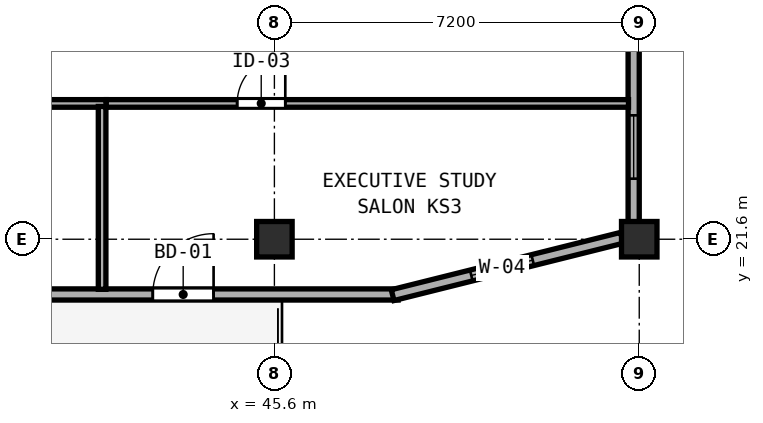
"""IFC4 building model, lengths in metres.
Left out: names, types, materials, properties, quantities, classifications, styles, units other than length and angle.
Written with IfcOpenShell. Run it as: python <this file> out.ifc"""

import sys

from ifc_helpers import new_model, si_unit, direction, frame, frame_2d, origin, origin_2d, place, context, subcontext, project, spatial, rectangle, hollow_rectangle, extrude, element, fill, save


model = new_model("IFC4")
c1 = context("Model", 3, precision=1e-05, world=origin(), true_north=direction((0.0, 1.0)))
c2 = subcontext(c1, "Body", "Model", "MODEL_VIEW")
j1 = project(units=[si_unit("LENGTHUNIT", "METRE"), si_unit("PLANEANGLEUNIT", "RADIAN")], contexts=[c1])
p1 = place(None, origin())
s1 = spatial("IfcSite", under=j1, at=p1, CompositionType="ELEMENT")
p2 = place(p1, origin())
s2 = spatial("IfcBuilding", under=s1, at=p2, CompositionType="ELEMENT")
p3 = place(p2, frame((0.0, 0.0, 282.2)))
s3 = spatial("IfcBuildingStorey", under=s2, at=p3, CompositionType="ELEMENT", Elevation=282.2)
for number, where, z_axis, x_axis in (
    (1, (52.8, 21.6, 0.0), (0.0, 0.0, 1.0), (1.0, 0.0, 0.0)),
    (2, (45.6, 21.6, 0.0), (0.0, 0.0, 1.0), (1.0, 0.0, 0.0)),
):
    element("IfcColumn", number, at=place(p3, frame(where, z_axis=z_axis, x_axis=x_axis)), inside=s3, PredefinedType="COLUMN", context=c2, shape_type="SweptSolid", body=[
        extrude(hollow_rectangle(XDim=0.7, YDim=0.7, WallThickness=0.026, at=origin_2d()), origin(), (0.0, 0.0, 1.0), 3.9),
    ])
p4 = place(p3, frame((28.759, 20.51, 0.0), z_axis=(0.0, 0.0, 1.0), x_axis=(1.0, 0.0, 0.0)))
e3 = element("IfcWall", 3, at=p4, inside=s3, PredefinedType="SOLIDWALL", context=c2, shape_type="SweptSolid", body=[
    extrude(rectangle(XDim=19.283, YDim=0.22, at=frame_2d((9.642, 0.0))), origin(), (0.0, 0.0, 1.0), 3.72),
])
p5 = place(p4, frame((15.641, 0.0, 0.0), z_axis=(0.0, 0.0, 1.0), x_axis=(-1.0, 0.0, 0.0)))
e4 = element("IfcOpeningElement", 4, at=p5, cuts=e3, PredefinedType="OPENING", context=c2, shape_type="SweptSolid", body=[
    extrude(rectangle(XDim=1.2, YDim=2.15, at=frame_2d((0.6, 1.075))), frame((0.0, 0.12, 0.0), z_axis=(0.0, -1.0, 0.0), x_axis=(1.0, 0.0, 0.0)), (0.0, 0.0, 1.0), 0.24),
])
p6 = place(p3, frame((47.933, 20.497, 0.0), z_axis=(0.0, 0.0, 1.0), x_axis=(0.970136341762, 0.242560257242, 0.0)))
e5 = element("IfcWall", 5, at=p6, inside=s3, PredefinedType="SOLIDWALL", context=c2, shape_type="SweptSolid", body=[
    extrude(rectangle(XDim=4.664, YDim=0.22, at=frame_2d((2.332, 0.0))), origin(), (0.0, 0.0, 1.0), 3.365),
])
p7 = place(p6, frame((1.6, 0.0, 0.85)))
e6 = element("IfcOpeningElement", 6, at=p7, cuts=e5, PredefinedType="OPENING", context=c2, shape_type="SweptSolid", body=[
    extrude(rectangle(XDim=1.25, YDim=1.95, at=frame_2d((0.625, 0.975))), frame((0.0, 0.12, 0.0), z_axis=(0.0, -1.0, 0.0), x_axis=(1.0, 0.0, 0.0)), (0.0, 0.0, 1.0), 0.24),
])
p8 = place(p3, frame((52.69, 21.942, 0.0), z_axis=(0.0, 0.0, 1.0), x_axis=(0.0, 1.0, 0.0)))
e7 = element("IfcWall", 7, at=p8, inside=s3, PredefinedType="SOLIDWALL", context=c2, shape_type="SweptSolid", body=[
    extrude(rectangle(XDim=5.366, YDim=0.22, at=frame_2d((2.683, 0.0))), origin(), (0.0, 0.0, 1.0), 3.365),
])
p9 = place(p8, frame((0.853, 0.0, 0.85)))
e8 = element("IfcOpeningElement", 8, at=p9, cuts=e7, PredefinedType="OPENING", context=c2, shape_type="SweptSolid", body=[
    extrude(rectangle(XDim=1.25, YDim=1.95, at=frame_2d((0.625, 0.975))), frame((0.0, 0.12, 0.0), z_axis=(0.0, -1.0, 0.0), x_axis=(1.0, 0.0, 0.0)), (0.0, 0.0, 1.0), 0.24),
])
p10 = place(p3, frame((34.682, 24.28, 0.0), z_axis=(0.0, 0.0, 1.0), x_axis=(1.0, 0.0, 0.0)))
e9 = element("IfcWall", 9, at=p10, inside=s3, PredefinedType="PARTITIONING", context=c2, shape_type="SweptSolid", body=[
    extrude(rectangle(XDim=7.598, YDim=0.15, at=frame_2d((3.799, 0.0))), origin(), (0.0, 0.0, 1.0), 3.72),
])
p11 = place(p10, frame((4.113, 0.0, 0.0), z_axis=(0.0, 0.0, 1.0), x_axis=(-1.0, 0.0, 0.0)))
e10 = element("IfcOpeningElement", 10, at=p11, cuts=e9, PredefinedType="OPENING", context=c2, shape_type="SweptSolid", body=[
    extrude(rectangle(XDim=0.95, YDim=2.12, at=frame_2d((0.475, 1.06))), frame((0.0, 0.085, 0.0), z_axis=(0.0, -1.0, 0.0), x_axis=(1.0, 0.0, 0.0)), (0.0, 0.0, 1.0), 0.17),
])
p12 = place(p3, frame((42.2, 20.612, 0.0), z_axis=(0.0, 0.0, 1.0), x_axis=(0.0, 1.0, 0.0)))
e11 = element("IfcWall", 11, at=p12, inside=s3, PredefinedType="PARTITIONING", context=c2, shape_type="SweptSolid", body=[
    extrude(rectangle(XDim=3.608, YDim=0.15, at=frame_2d((1.804, 0.0))), origin(), (0.0, 0.0, 1.0), 3.72),
])
p13 = place(p3, frame((42.282, 24.28, 0.0), z_axis=(0.0, 0.0, 1.0), x_axis=(1.0, 0.0, 0.0)))
e12 = element("IfcWall", 12, at=p13, inside=s3, PredefinedType="PARTITIONING", context=c2, shape_type="SweptSolid", body=[
    extrude(rectangle(XDim=10.306, YDim=0.15, at=frame_2d((5.153, 0.0))), origin(), (0.0, 0.0, 1.0), 3.72),
])
p14 = place(p13, frame((3.533, 0.0, 0.0), z_axis=(0.0, 0.0, 1.0), x_axis=(-1.0, 0.0, 0.0)))
e13 = element("IfcOpeningElement", 13, at=p14, cuts=e12, PredefinedType="OPENING", context=c2, shape_type="SweptSolid", body=[
    extrude(rectangle(XDim=0.95, YDim=2.12, at=frame_2d((0.475, 1.06))), frame((0.0, 0.085, 0.0), z_axis=(0.0, -1.0, 0.0), x_axis=(1.0, 0.0, 0.0)), (0.0, 0.0, 1.0), 0.17),
])
p15 = place(p7, origin())
e14 = element("IfcWindow", 14, at=p15, inside=s3, PartitioningType="SINGLE_PANEL", PredefinedType="WINDOW", context=c2, shape_type="SweptSolid", body=[
    extrude(rectangle(XDim=1.25, YDim=1.95, at=frame_2d((0.625, 0.975))), frame((0.0, 0.03, 0.0), z_axis=(0.0, -1.0, 0.0), x_axis=(1.0, 0.0, 0.0)), (0.0, 0.0, 1.0), 0.06),
])
fill(e6, e14)
p16 = place(p9, origin())
e15 = element("IfcWindow", 15, at=p16, inside=s3, PartitioningType="SINGLE_PANEL", PredefinedType="WINDOW", context=c2, shape_type="SweptSolid", body=[
    extrude(rectangle(XDim=1.25, YDim=1.95, at=frame_2d((0.625, 0.975))), frame((0.0, 0.03, 0.0), z_axis=(0.0, -1.0, 0.0), x_axis=(1.0, 0.0, 0.0)), (0.0, 0.0, 1.0), 0.06),
])
fill(e8, e15)
p17 = place(p5, origin())
e16 = element("IfcDoor", 16, at=p17, inside=s3, OperationType="SINGLE_SWING_LEFT", PredefinedType="DOOR", context=c2, shape_type="SweptSolid", body=[
    extrude(rectangle(XDim=1.2, YDim=2.15, at=frame_2d((0.6, 1.075))), frame((0.0, 0.025, 0.0), z_axis=(0.0, -1.0, 0.0), x_axis=(1.0, 0.0, 0.0)), (0.0, 0.0, 1.0), 0.05),
])
fill(e4, e16)
p18 = place(p14, origin())
e17 = element("IfcDoor", 17, at=p18, inside=s3, OperationType="SINGLE_SWING_LEFT", PredefinedType="DOOR", context=c2, shape_type="SweptSolid", body=[
    extrude(rectangle(XDim=0.95, YDim=2.12, at=frame_2d((0.475, 1.06))), frame((0.0, 0.025, 0.0), z_axis=(0.0, -1.0, 0.0), x_axis=(1.0, 0.0, 0.0)), (0.0, 0.0, 1.0), 0.05),
])
fill(e13, e17)
save(model, sys.argv[1])
